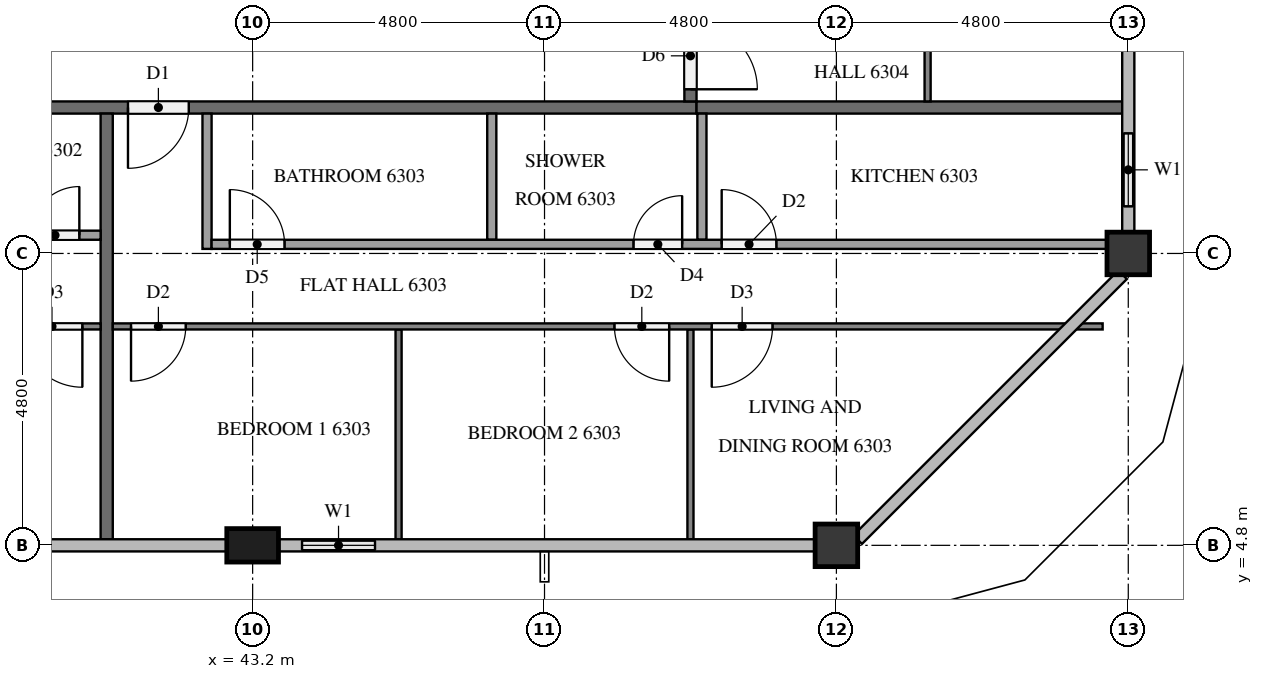
"""IFC4 building model, lengths in metres.
Left out: names, types, materials, properties, quantities, classifications, styles, units other than length and angle.
Written with IfcOpenShell. Run it as: python <this file> out.ifc"""

import sys

from ifc_helpers import new_model, si_unit, direction, frame, frame_2d, origin, origin_2d, place, context, subcontext, project, spatial, rectangle, extrude, element, fill, save


model = new_model("IFC4")
c1 = context("Model", 3, precision=1e-05, world=origin(), true_north=direction((0.0, 1.0)))
c2 = subcontext(c1, "Body", "Model", "MODEL_VIEW")
j1 = project(units=[si_unit("LENGTHUNIT", "METRE"), si_unit("PLANEANGLEUNIT", "RADIAN")], contexts=[c1])
p1 = place(None, origin())
s1 = spatial("IfcSite", under=j1, at=p1, CompositionType="ELEMENT")
p2 = place(p1, origin())
s2 = spatial("IfcBuilding", under=s1, at=p2, CompositionType="ELEMENT")
p3 = place(p2, frame((0.0, 0.0, 242.2)))
s3 = spatial("IfcBuildingStorey", under=s2, at=p3, CompositionType="ELEMENT", Elevation=242.2)
p4 = place(p3, frame((43.2, 4.8, 0.0), z_axis=(0.0, 0.0, 1.0), x_axis=(1.0, 0.0, 0.0)))
e1 = element("IfcColumn", 1, at=p4, inside=s3, PredefinedType="COLUMN", context=c2, shape_type="SweptSolid", body=[
    extrude(rectangle(XDim=0.85, YDim=0.55, at=origin_2d()), origin(), (0.0, 0.0, 1.0), 3.2),
])
for number, where, z_axis, x_axis in (
    (2, (52.8, 4.8, 0.0), (0.0, 0.0, 1.0), (1.0, 0.0, 0.0)),
    (3, (57.6, 9.6, 0.0), (0.0, 0.0, 1.0), (1.0, 0.0, 0.0)),
):
    element("IfcColumn", number, at=place(p3, frame(where, z_axis=z_axis, x_axis=x_axis)), inside=s3, PredefinedType="COLUMN", context=c2, shape_type="SweptSolid", body=[
        extrude(rectangle(XDim=0.7, YDim=0.7, at=origin_2d()), origin(), (0.0, 0.0, 1.0), 3.2),
    ])
p5 = place(p3, frame((43.625, 4.8, 0.0), z_axis=(0.0, 0.0, 1.0), x_axis=(1.0, 0.0, 0.0)))
e4 = element("IfcWall", 4, at=p5, inside=s3, PredefinedType="SOLIDWALL", context=c2, shape_type="SweptSolid", body=[
    extrude(rectangle(XDim=1.975, YDim=0.15, at=frame_2d((0.988, 0.0))), origin(), (0.0, 0.0, 1.0), 3.2),
])
p6 = place(p5, frame((0.387, 0.0, 0.9)))
e5 = element("IfcOpeningElement", 5, at=p6, cuts=e4, PredefinedType="OPENING", context=c2, shape_type="SweptSolid", body=[
    extrude(rectangle(XDim=1.2, YDim=1.4, at=frame_2d((0.6, 0.7))), frame((0.0, 0.085, 0.0), z_axis=(0.0, -1.0, 0.0), x_axis=(1.0, 0.0, 0.0)), (0.0, 0.0, 1.0), 0.17),
])
p7 = place(p3, frame((57.6, 9.95, 0.0), z_axis=(0.0, 0.0, 1.0), x_axis=(0.0, 1.0, 0.0)))
e6 = element("IfcWall", 6, at=p7, inside=s3, PredefinedType="SOLIDWALL", context=c2, shape_type="SweptSolid", body=[
    extrude(rectangle(XDim=2.05, YDim=0.15, at=frame_2d((1.025, 0.0))), origin(), (0.0, 0.0, 1.0), 3.2),
])
p8 = place(p7, frame((0.425, 0.0, 0.9)))
e7 = element("IfcOpeningElement", 7, at=p8, cuts=e6, PredefinedType="OPENING", context=c2, shape_type="SweptSolid", body=[
    extrude(rectangle(XDim=1.2, YDim=1.4, at=frame_2d((0.6, 0.7))), frame((0.0, 0.085, 0.0), z_axis=(0.0, -1.0, 0.0), x_axis=(1.0, 0.0, 0.0)), (0.0, 0.0, 1.0), 0.17),
])
p9 = place(p3, frame((50.5, 12.0, 0.0), z_axis=(0.0, 0.0, 1.0), x_axis=(-1.0, 0.0, 0.0)))
e8 = element("IfcWall", 8, at=p9, inside=s3, PredefinedType="PARTITIONING", context=c2, shape_type="SweptSolid", body=[
    extrude(rectangle(XDim=38.6, YDim=0.2, at=frame_2d((19.3, 0.0))), origin(), (0.0, 0.0, 1.0), 3.2),
])
p10 = place(p9, frame((37.1, 0.0, 0.0)))
e9 = element("IfcOpeningElement", 9, at=p10, cuts=e8, PredefinedType="OPENING", context=c2, shape_type="SweptSolid", body=[
    extrude(rectangle(XDim=1.1, YDim=2.1, at=frame_2d((0.55, 1.05))), frame((0.0, 0.11, 0.0), z_axis=(0.0, -1.0, 0.0), x_axis=(1.0, 0.0, 0.0)), (0.0, 0.0, 1.0), 0.22),
])
p11 = place(p9, frame((17.95, 0.0, 0.0)))
e10 = element("IfcOpeningElement", 10, at=p11, cuts=e8, PredefinedType="OPENING", context=c2, shape_type="SweptSolid", body=[
    extrude(rectangle(XDim=1.0, YDim=2.1, at=frame_2d((0.5, 1.05))), frame((0.0, 0.11, 0.0), z_axis=(0.0, -1.0, 0.0), x_axis=(1.0, 0.0, 0.0)), (0.0, 0.0, 1.0), 0.22),
])
p12 = place(p9, frame((8.35, 0.0, 0.0)))
e11 = element("IfcOpeningElement", 11, at=p12, cuts=e8, PredefinedType="OPENING", context=c2, shape_type="SweptSolid", body=[
    extrude(rectangle(XDim=1.0, YDim=2.1, at=frame_2d((0.5, 1.05))), frame((0.0, 0.11, 0.0), z_axis=(0.0, -1.0, 0.0), x_axis=(1.0, 0.0, 0.0)), (0.0, 0.0, 1.0), 0.22),
])
p13 = place(p3, frame((50.4, 40.7, 0.0), z_axis=(0.0, 0.0, 1.0), x_axis=(0.0, -1.0, 0.0)))
e12 = element("IfcWall", 12, at=p13, inside=s3, PredefinedType="PARTITIONING", context=c2, shape_type="SweptSolid", body=[
    extrude(rectangle(XDim=28.6, YDim=0.2, at=frame_2d((14.3, 0.0))), origin(), (0.0, 0.0, 1.0), 3.2),
])
p14 = place(p13, frame((27.3, 0.0, 0.0)))
e13 = element("IfcOpeningElement", 13, at=p14, cuts=e12, PredefinedType="OPENING", context=c2, shape_type="SweptSolid", body=[
    extrude(rectangle(XDim=1.1, YDim=2.1, at=frame_2d((0.55, 1.05))), frame((0.0, 0.11, 0.0), z_axis=(0.0, -1.0, 0.0), x_axis=(1.0, 0.0, 0.0)), (0.0, 0.0, 1.0), 0.22),
])
p15 = place(p13, frame((0.25, 0.0, 0.0)))
e14 = element("IfcOpeningElement", 14, at=p15, cuts=e12, PredefinedType="OPENING", context=c2, shape_type="SweptSolid", body=[
    extrude(rectangle(XDim=1.0, YDim=2.1, at=frame_2d((0.5, 1.05))), frame((0.0, 0.11, 0.0), z_axis=(0.0, -1.0, 0.0), x_axis=(1.0, 0.0, 0.0)), (0.0, 0.0, 1.0), 0.22),
])
for number, where, z_axis, x_axis in (
    (15, (40.8, 11.9, 0.0), (0.0, 0.0, 1.0), (0.0, -1.0, 0.0)),
    (16, (50.5, 12.0, 0.0), (0.0, 0.0, 1.0), (1.0, 0.0, 0.0)),
):
    element("IfcWall", number, at=place(p3, frame(where, z_axis=z_axis, x_axis=x_axis)), inside=s3, PredefinedType="PARTITIONING", context=c2, shape_type="SweptSolid", body=[
        extrude(rectangle(XDim=7.0, YDim=0.2, at=frame_2d((3.5, 0.0))), origin(), (0.0, 0.0, 1.0), 3.2),
    ])
p16 = place(p3, frame((40.7, 8.4, 0.0), z_axis=(0.0, 0.0, 1.0), x_axis=(-1.0, 0.0, 0.0)))
e17 = element("IfcWall", 17, at=p16, inside=s3, PredefinedType="PARTITIONING", context=c2, shape_type="SweptSolid", body=[
    extrude(rectangle(XDim=9.4, YDim=0.1, at=frame_2d((4.7, 0.0))), origin(), (0.0, 0.0, 1.0), 3.2),
])
p17 = place(p16, frame((8.2, 0.0, 0.0)))
e18 = element("IfcOpeningElement", 18, at=p17, cuts=e17, PredefinedType="OPENING", context=c2, shape_type="SweptSolid", body=[
    extrude(rectangle(XDim=0.9, YDim=2.1, at=frame_2d((0.45, 1.05))), frame((0.0, 0.06, 0.0), z_axis=(0.0, -1.0, 0.0), x_axis=(1.0, 0.0, 0.0)), (0.0, 0.0, 1.0), 0.12),
])
p18 = place(p16, frame((0.3, 0.0, 0.0)))
e19 = element("IfcOpeningElement", 19, at=p18, cuts=e17, PredefinedType="OPENING", context=c2, shape_type="SweptSolid", body=[
    extrude(rectangle(XDim=1.0, YDim=2.1, at=frame_2d((0.5, 1.05))), frame((0.0, 0.06, 0.0), z_axis=(0.0, -1.0, 0.0), x_axis=(1.0, 0.0, 0.0)), (0.0, 0.0, 1.0), 0.12),
])
p19 = place(p3, frame((32.925, 9.9, 0.0), z_axis=(0.0, 0.0, 1.0), x_axis=(1.0, 0.0, 0.0)))
e20 = element("IfcWall", 20, at=p19, inside=s3, PredefinedType="PARTITIONING", context=c2, shape_type="SweptSolid", body=[
    extrude(rectangle(XDim=7.775, YDim=0.15, at=frame_2d((3.887, 0.0))), origin(), (0.0, 0.0, 1.0), 3.2),
])
p20 = place(p19, frame((0.3, 0.0, 0.0)))
e21 = element("IfcOpeningElement", 21, at=p20, cuts=e20, PredefinedType="OPENING", context=c2, shape_type="SweptSolid", body=[
    extrude(rectangle(XDim=0.9, YDim=2.1, at=frame_2d((0.45, 1.05))), frame((0.0, 0.085, 0.0), z_axis=(0.0, -1.0, 0.0), x_axis=(1.0, 0.0, 0.0)), (0.0, 0.0, 1.0), 0.17),
])
p21 = place(p19, frame((6.625, 0.0, 0.0)))
e22 = element("IfcOpeningElement", 22, at=p21, cuts=e20, PredefinedType="OPENING", context=c2, shape_type="SweptSolid", body=[
    extrude(rectangle(XDim=0.8, YDim=2.1, at=frame_2d((0.4, 1.05))), frame((0.0, 0.085, 0.0), z_axis=(0.0, -1.0, 0.0), x_axis=(1.0, 0.0, 0.0)), (0.0, 0.0, 1.0), 0.17),
])
for number, where, z_axis, x_axis in (
    (23, (45.6, 8.35, 0.0), (0.0, 0.0, 1.0), (0.0, -1.0, 0.0)),
    (24, (50.4, 8.35, 0.0), (0.0, 0.0, 1.0), (0.0, -1.0, 0.0)),
):
    element("IfcWall", number, at=place(p3, frame(where, z_axis=z_axis, x_axis=x_axis)), inside=s3, PredefinedType="PARTITIONING", context=c2, shape_type="SweptSolid", body=[
        extrude(rectangle(XDim=3.45, YDim=0.1, at=frame_2d((1.725, 0.0))), origin(), (0.0, 0.0, 1.0), 3.2),
    ])
p22 = place(p3, frame((57.178, 8.4, 0.0), z_axis=(0.0, 0.0, 1.0), x_axis=(-1.0, 0.0, 0.0)))
e25 = element("IfcWall", 25, at=p22, inside=s3, PredefinedType="PARTITIONING", context=c2, shape_type="SweptSolid", body=[
    extrude(rectangle(XDim=16.279, YDim=0.1, at=frame_2d((8.139, 0.0))), origin(), (0.0, 0.0, 1.0), 3.2),
])
p23 = place(p22, frame((15.079, 0.0, 0.0)))
e26 = element("IfcOpeningElement", 26, at=p23, cuts=e25, PredefinedType="OPENING", context=c2, shape_type="SweptSolid", body=[
    extrude(rectangle(XDim=0.9, YDim=2.1, at=frame_2d((0.45, 1.05))), frame((0.0, 0.06, 0.0), z_axis=(0.0, -1.0, 0.0), x_axis=(1.0, 0.0, 0.0)), (0.0, 0.0, 1.0), 0.12),
])
p24 = place(p22, frame((7.128, 0.0, 0.0)))
e27 = element("IfcOpeningElement", 27, at=p24, cuts=e25, PredefinedType="OPENING", context=c2, shape_type="SweptSolid", body=[
    extrude(rectangle(XDim=0.9, YDim=2.1, at=frame_2d((0.45, 1.05))), frame((0.0, 0.06, 0.0), z_axis=(0.0, -1.0, 0.0), x_axis=(1.0, 0.0, 0.0)), (0.0, 0.0, 1.0), 0.12),
])
p25 = place(p22, frame((5.428, 0.0, 0.0)))
e28 = element("IfcOpeningElement", 28, at=p25, cuts=e25, PredefinedType="OPENING", context=c2, shape_type="SweptSolid", body=[
    extrude(rectangle(XDim=1.0, YDim=2.1, at=frame_2d((0.5, 1.05))), frame((0.0, 0.06, 0.0), z_axis=(0.0, -1.0, 0.0), x_axis=(1.0, 0.0, 0.0)), (0.0, 0.0, 1.0), 0.12),
])
for number, where, z_axis, x_axis in (
    (29, (47.133, 11.9, 0.0), (0.0, 0.0, 1.0), (0.0, -1.0, 0.0)),
    (30, (50.588, 11.9, 0.0), (0.0, 0.0, 1.0), (0.0, -1.0, 0.0)),
):
    element("IfcWall", number, at=place(p3, frame(where, z_axis=z_axis, x_axis=x_axis)), inside=s3, PredefinedType="PARTITIONING", context=c2, shape_type="SweptSolid", body=[
        extrude(rectangle(XDim=2.075, YDim=0.15, at=frame_2d((1.038, 0.0))), origin(), (0.0, 0.0, 1.0), 3.2),
    ])
p26 = place(p3, frame((42.45, 11.9, 0.0), z_axis=(0.0, 0.0, 1.0), x_axis=(0.0, -1.0, 0.0)))
e31 = element("IfcWall", 31, at=p26, inside=s3, PredefinedType="PARTITIONING", context=c2, shape_type="SweptSolid", body=[
    extrude(rectangle(XDim=2.225, YDim=0.15, at=frame_2d((1.112, 0.0))), origin(), (0.0, 0.0, 1.0), 3.2),
])
p27 = place(p3, frame((42.525, 9.75, 0.0), z_axis=(0.0, 0.0, 1.0), x_axis=(1.0, 0.0, 0.0)))
e32 = element("IfcWall", 32, at=p27, inside=s3, PredefinedType="PARTITIONING", context=c2, shape_type="SweptSolid", body=[
    extrude(rectangle(XDim=14.725, YDim=0.15, at=frame_2d((7.363, 0.0))), origin(), (0.0, 0.0, 1.0), 3.2),
])
p28 = place(p27, frame((0.3, 0.0, 0.0)))
e33 = element("IfcOpeningElement", 33, at=p28, cuts=e32, PredefinedType="OPENING", context=c2, shape_type="SweptSolid", body=[
    extrude(rectangle(XDim=0.9, YDim=2.1, at=frame_2d((0.45, 1.05))), frame((0.0, 0.085, 0.0), z_axis=(0.0, -1.0, 0.0), x_axis=(1.0, 0.0, 0.0)), (0.0, 0.0, 1.0), 0.17),
])
p29 = place(p27, frame((6.938, 0.0, 0.0)))
e34 = element("IfcOpeningElement", 34, at=p29, cuts=e32, PredefinedType="OPENING", context=c2, shape_type="SweptSolid", body=[
    extrude(rectangle(XDim=0.8, YDim=2.1, at=frame_2d((0.4, 1.05))), frame((0.0, 0.085, 0.0), z_axis=(0.0, -1.0, 0.0), x_axis=(1.0, 0.0, 0.0)), (0.0, 0.0, 1.0), 0.17),
])
p30 = place(p27, frame((8.388, 0.0, 0.0)))
e35 = element("IfcOpeningElement", 35, at=p30, cuts=e32, PredefinedType="OPENING", context=c2, shape_type="SweptSolid", body=[
    extrude(rectangle(XDim=0.9, YDim=2.1, at=frame_2d((0.45, 1.05))), frame((0.0, 0.085, 0.0), z_axis=(0.0, -1.0, 0.0), x_axis=(1.0, 0.0, 0.0)), (0.0, 0.0, 1.0), 0.17),
])
p31 = place(p3, frame((54.3, 31.1, 0.0), z_axis=(0.0, 0.0, 1.0), x_axis=(0.0, -1.0, 0.0)))
e36 = element("IfcWall", 36, at=p31, inside=s3, PredefinedType="PARTITIONING", context=c2, shape_type="SweptSolid", body=[
    extrude(rectangle(XDim=19.0, YDim=0.1, at=frame_2d((9.5, 0.0))), origin(), (0.0, 0.0, 1.0), 3.2),
])
p32 = place(p31, frame((14.65, 0.0, 0.0)))
e37 = element("IfcOpeningElement", 37, at=p32, cuts=e36, PredefinedType="OPENING", context=c2, shape_type="SweptSolid", body=[
    extrude(rectangle(XDim=0.9, YDim=2.1, at=frame_2d((0.45, 1.05))), frame((0.0, 0.06, 0.0), z_axis=(0.0, -1.0, 0.0), x_axis=(1.0, 0.0, 0.0)), (0.0, 0.0, 1.0), 0.12),
])
p33 = place(p31, frame((12.95, 0.0, 0.0)))
e38 = element("IfcOpeningElement", 38, at=p33, cuts=e36, PredefinedType="OPENING", context=c2, shape_type="SweptSolid", body=[
    extrude(rectangle(XDim=1.0, YDim=2.1, at=frame_2d((0.5, 1.05))), frame((0.0, 0.06, 0.0), z_axis=(0.0, -1.0, 0.0), x_axis=(1.0, 0.0, 0.0)), (0.0, 0.0, 1.0), 0.12),
])
p34 = place(p31, frame((5.05, 0.0, 0.0)))
e39 = element("IfcOpeningElement", 39, at=p34, cuts=e36, PredefinedType="OPENING", context=c2, shape_type="SweptSolid", body=[
    extrude(rectangle(XDim=0.9, YDim=2.1, at=frame_2d((0.45, 1.05))), frame((0.0, 0.06, 0.0), z_axis=(0.0, -1.0, 0.0), x_axis=(1.0, 0.0, 0.0)), (0.0, 0.0, 1.0), 0.12),
])
p35 = place(p31, frame((3.45, 0.0, 0.0)))
e40 = element("IfcOpeningElement", 40, at=p35, cuts=e36, PredefinedType="OPENING", context=c2, shape_type="SweptSolid", body=[
    extrude(rectangle(XDim=0.9, YDim=2.1, at=frame_2d((0.45, 1.05))), frame((0.0, 0.06, 0.0), z_axis=(0.0, -1.0, 0.0), x_axis=(1.0, 0.0, 0.0)), (0.0, 0.0, 1.0), 0.12),
])
p36 = place(p6, origin())
e41 = element("IfcWindow", 41, at=p36, inside=s3, PartitioningType="SINGLE_PANEL", PredefinedType="WINDOW", context=c2, shape_type="SweptSolid", body=[
    extrude(rectangle(XDim=1.2, YDim=1.4, at=frame_2d((0.6, 0.7))), frame((0.0, 0.03, 0.0), z_axis=(0.0, -1.0, 0.0), x_axis=(1.0, 0.0, 0.0)), (0.0, 0.0, 1.0), 0.06),
])
fill(e5, e41)
p37 = place(p8, origin())
e42 = element("IfcWindow", 42, at=p37, inside=s3, PartitioningType="SINGLE_PANEL", PredefinedType="WINDOW", context=c2, shape_type="SweptSolid", body=[
    extrude(rectangle(XDim=1.2, YDim=1.4, at=frame_2d((0.6, 0.7))), frame((0.0, 0.03, 0.0), z_axis=(0.0, -1.0, 0.0), x_axis=(1.0, 0.0, 0.0)), (0.0, 0.0, 1.0), 0.06),
])
fill(e7, e42)
p38 = place(p12, origin())
e43 = element("IfcDoor", 43, at=p38, inside=s3, OperationType="SINGLE_SWING_RIGHT", PredefinedType="DOOR", context=c2, shape_type="SweptSolid", body=[
    extrude(rectangle(XDim=1.0, YDim=2.1, at=frame_2d((0.5, 1.05))), frame((0.0, 0.025, 0.0), z_axis=(0.0, -1.0, 0.0), x_axis=(1.0, 0.0, 0.0)), (0.0, 0.0, 1.0), 0.05),
])
fill(e11, e43)
p39 = place(p14, origin())
e44 = element("IfcDoor", 44, at=p39, inside=s3, OperationType="SINGLE_SWING_RIGHT", PredefinedType="DOOR", context=c2, shape_type="SweptSolid", body=[
    extrude(rectangle(XDim=1.1, YDim=2.1, at=frame_2d((0.55, 1.05))), frame((0.0, 0.025, 0.0), z_axis=(0.0, -1.0, 0.0), x_axis=(1.0, 0.0, 0.0)), (0.0, 0.0, 1.0), 0.05),
])
fill(e13, e44)
p40 = place(p18, origin())
e45 = element("IfcDoor", 45, at=p40, inside=s3, OperationType="SINGLE_SWING_LEFT", PredefinedType="DOOR", context=c2, shape_type="SweptSolid", body=[
    extrude(rectangle(XDim=1.0, YDim=2.1, at=frame_2d((0.5, 1.05))), frame((0.0, 0.025, 0.0), z_axis=(0.0, -1.0, 0.0), x_axis=(1.0, 0.0, 0.0)), (0.0, 0.0, 1.0), 0.05),
])
fill(e19, e45)
p41 = place(p21, origin())
e46 = element("IfcDoor", 46, at=p41, inside=s3, OperationType="SINGLE_SWING_RIGHT", PredefinedType="DOOR", context=c2, shape_type="SweptSolid", body=[
    extrude(rectangle(XDim=0.8, YDim=2.1, at=frame_2d((0.4, 1.05))), frame((0.0, 0.025, 0.0), z_axis=(0.0, -1.0, 0.0), x_axis=(1.0, 0.0, 0.0)), (0.0, 0.0, 1.0), 0.05),
])
fill(e22, e46)
p42 = place(p23, origin())
e47 = element("IfcDoor", 47, at=p42, inside=s3, OperationType="SINGLE_SWING_RIGHT", PredefinedType="DOOR", context=c2, shape_type="SweptSolid", body=[
    extrude(rectangle(XDim=0.9, YDim=2.1, at=frame_2d((0.45, 1.05))), frame((0.0, 0.025, 0.0), z_axis=(0.0, -1.0, 0.0), x_axis=(1.0, 0.0, 0.0)), (0.0, 0.0, 1.0), 0.05),
])
fill(e26, e47)
p43 = place(p24, origin())
e48 = element("IfcDoor", 48, at=p43, inside=s3, OperationType="SINGLE_SWING_LEFT", PredefinedType="DOOR", context=c2, shape_type="SweptSolid", body=[
    extrude(rectangle(XDim=0.9, YDim=2.1, at=frame_2d((0.45, 1.05))), frame((0.0, 0.025, 0.0), z_axis=(0.0, -1.0, 0.0), x_axis=(1.0, 0.0, 0.0)), (0.0, 0.0, 1.0), 0.05),
])
fill(e27, e48)
p44 = place(p25, origin())
e49 = element("IfcDoor", 49, at=p44, inside=s3, OperationType="SINGLE_SWING_RIGHT", PredefinedType="DOOR", context=c2, shape_type="SweptSolid", body=[
    extrude(rectangle(XDim=1.0, YDim=2.1, at=frame_2d((0.5, 1.05))), frame((0.0, 0.025, 0.0), z_axis=(0.0, -1.0, 0.0), x_axis=(1.0, 0.0, 0.0)), (0.0, 0.0, 1.0), 0.05),
])
fill(e28, e49)
p45 = place(p28, origin())
e50 = element("IfcDoor", 50, at=p45, inside=s3, OperationType="SINGLE_SWING_LEFT", PredefinedType="DOOR", context=c2, shape_type="SweptSolid", body=[
    extrude(rectangle(XDim=0.9, YDim=2.1, at=frame_2d((0.45, 1.05))), frame((0.0, 0.025, 0.0), z_axis=(0.0, -1.0, 0.0), x_axis=(1.0, 0.0, 0.0)), (0.0, 0.0, 1.0), 0.05),
])
fill(e33, e50)
p46 = place(p29, origin())
e51 = element("IfcDoor", 51, at=p46, inside=s3, OperationType="SINGLE_SWING_RIGHT", PredefinedType="DOOR", context=c2, shape_type="SweptSolid", body=[
    extrude(rectangle(XDim=0.8, YDim=2.1, at=frame_2d((0.4, 1.05))), frame((0.0, 0.025, 0.0), z_axis=(0.0, -1.0, 0.0), x_axis=(1.0, 0.0, 0.0)), (0.0, 0.0, 1.0), 0.05),
])
fill(e34, e51)
p47 = place(p30, origin())
e52 = element("IfcDoor", 52, at=p47, inside=s3, OperationType="SINGLE_SWING_LEFT", PredefinedType="DOOR", context=c2, shape_type="SweptSolid", body=[
    extrude(rectangle(XDim=0.9, YDim=2.1, at=frame_2d((0.45, 1.05))), frame((0.0, 0.025, 0.0), z_axis=(0.0, -1.0, 0.0), x_axis=(1.0, 0.0, 0.0)), (0.0, 0.0, 1.0), 0.05),
])
fill(e35, e52)
save(model, sys.argv[1])
